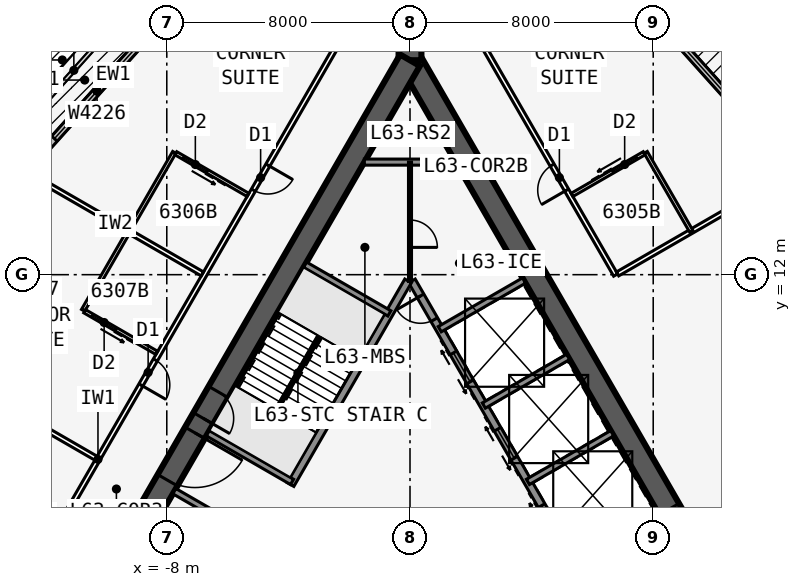
"""IFC4 building model, lengths in metres.
Left out: names, types, materials, properties, quantities, classifications, styles, units other than length and angle.
Written with IfcOpenShell. Run it as: python <this file> out.ifc"""

import sys

from ifc_helpers import new_model, si_unit, direction, frame, frame_2d, origin, place, context, subcontext, project, spatial, rectangle, extrude, element, fill, save


model = new_model("IFC4")
c1 = context("Model", 3, precision=1e-05, world=origin(), true_north=direction((0.0, 1.0)))
c2 = subcontext(c1, "Body", "Model", "MODEL_VIEW")
j1 = project(units=[si_unit("LENGTHUNIT", "METRE"), si_unit("PLANEANGLEUNIT", "RADIAN")], contexts=[c1])
p1 = place(None, origin())
s1 = spatial("IfcSite", under=j1, at=p1, CompositionType="ELEMENT")
p2 = place(p1, origin())
s2 = spatial("IfcBuilding", under=s1, at=p2, CompositionType="ELEMENT")
p3 = place(p2, frame((0.0, 0.0, 239.3)))
s3 = spatial("IfcBuildingStorey", under=s2, at=p3, CompositionType="ELEMENT", Elevation=239.3)
p4 = place(p3, frame((16.5, -9.526, 0.0), z_axis=(0.0, 0.0, 1.0), x_axis=(-0.499999749417, 0.866025548458, 0.0)))
e1 = element("IfcWall", 1, at=p4, inside=s3, PredefinedType="SHEAR", context=c2, shape_type="SweptSolid", body=[
    extrude(rectangle(XDim=33.0, YDim=0.75, at=frame_2d((16.5, 0.0))), origin(), (0.0, 0.0, 1.0), 3.6),
])
p5 = place(p4, frame((14.15, 0.0, 0.0)))
e2 = element("IfcOpeningElement", 2, at=p5, cuts=e1, PredefinedType="OPENING", context=c2, shape_type="SweptSolid", body=[
    extrude(rectangle(XDim=1.8, YDim=2.13, at=frame_2d((0.9, 1.065))), frame((0.0, 0.385, 0.0), z_axis=(0.0, -1.0, 0.0), x_axis=(1.0, 0.0, 0.0)), (0.0, 0.0, 1.0), 0.77),
])
p6 = place(p4, frame((12.6, 0.0, 0.0)))
e3 = element("IfcOpeningElement", 3, at=p6, cuts=e1, PredefinedType="OPENING", context=c2, shape_type="SweptSolid", body=[
    extrude(rectangle(XDim=1.0, YDim=2.13, at=frame_2d((0.5, 1.065))), frame((0.0, 0.385, 0.0), z_axis=(0.0, -1.0, 0.0), x_axis=(1.0, 0.0, 0.0)), (0.0, 0.0, 1.0), 0.77),
])
p7 = place(p3, frame((5.379, 2.586, 0.0), z_axis=(0.0, 0.0, 1.0), x_axis=(-0.500001375892, 0.866024609411, 0.0)))
e4 = element("IfcWall", 4, at=p7, inside=s3, PredefinedType="SOLIDWALL", context=c2, shape_type="SweptSolid", body=[
    extrude(rectangle(XDim=10.633, YDim=0.25, at=frame_2d((5.316, 0.0))), origin(), (0.0, 0.0, 1.0), 3.435),
])
p8 = place(p7, frame((9.164, 0.0, 0.0)))
e5 = element("IfcOpeningElement", 5, at=p8, cuts=e4, PredefinedType="OPENING", context=c2, shape_type="SweptSolid", body=[
    extrude(rectangle(XDim=0.9, YDim=2.13, at=frame_2d((0.45, 1.065))), frame((0.0, 0.135, 0.0), z_axis=(0.0, -1.0, 0.0), x_axis=(1.0, 0.0, 0.0)), (0.0, 0.0, 1.0), 0.27),
])
p9 = place(p7, frame((1.0, 0.0, 0.0)))
e6 = element("IfcOpeningElement", 6, at=p9, cuts=e4, PredefinedType="OPENING", context=c2, shape_type="SweptSolid", body=[
    extrude(rectangle(XDim=1.1, YDim=2.13, at=frame_2d((0.55, 1.065))), frame((0.0, 0.135, 0.0), z_axis=(0.0, -1.0, 0.0), x_axis=(1.0, 0.0, 0.0)), (0.0, 0.0, 1.0), 0.27),
])
p10 = place(p7, frame((3.9, 0.0, 0.0)))
e7 = element("IfcOpeningElement", 7, at=p10, cuts=e4, PredefinedType="OPENING", context=c2, shape_type="SweptSolid", body=[
    extrude(rectangle(XDim=1.1, YDim=2.13, at=frame_2d((0.55, 1.065))), frame((0.0, 0.135, 0.0), z_axis=(0.0, -1.0, 0.0), x_axis=(1.0, 0.0, 0.0)), (0.0, 0.0, 1.0), 0.27),
])
p11 = place(p7, frame((6.8, 0.0, 0.0)))
e8 = element("IfcOpeningElement", 8, at=p11, cuts=e4, PredefinedType="OPENING", context=c2, shape_type="SweptSolid", body=[
    extrude(rectangle(XDim=1.1, YDim=2.13, at=frame_2d((0.55, 1.065))), frame((0.0, 0.135, 0.0), z_axis=(0.0, -1.0, 0.0), x_axis=(1.0, 0.0, 0.0)), (0.0, 0.0, 1.0), 0.27),
])
p12 = place(p3, frame((5.329, 2.673, 0.0), z_axis=(0.0, 0.0, 1.0), x_axis=(0.866022944154, 0.50000426018, 0.0)))
e9 = element("IfcWall", 9, at=p12, inside=s3, PredefinedType="SOLIDWALL", context=c2, shape_type="SweptSolid", body=[
    extrude(rectangle(XDim=3.2, YDim=0.2, at=frame_2d((1.6, 0.0))), origin(), (0.0, 0.0, 1.0), 3.435),
])
for number, where, z_axis, x_axis in (
    (10, (3.879, 5.184, 0.0), (0.0, 0.0, 1.0), (0.866, 0.5, 0.0)),
    (11, (2.429, 7.696, 0.0), (0.0, 0.0, 1.0), (0.866, 0.5, 0.0)),
    (12, (0.979, 10.207, 0.0), (0.0, 0.0, 1.0), (0.866, 0.5, 0.0)),
):
    element("IfcWall", number, at=place(p3, frame(where, z_axis=z_axis, x_axis=x_axis)), inside=s3, PredefinedType="SOLIDWALL", context=c2, shape_type="SweptSolid", body=[
        extrude(rectangle(XDim=3.2, YDim=0.2, at=frame_2d((1.6, 0.0))), origin(), (0.0, 0.0, 1.0), 3.435),
    ])
p13 = place(p3, frame((0.0, 19.052, 0.0), z_axis=(0.0, 0.0, 1.0), x_axis=(-0.499999749417, -0.866025548458, 0.0)))
e13 = element("IfcWall", 13, at=p13, inside=s3, PredefinedType="SHEAR", context=c2, shape_type="SweptSolid", body=[
    extrude(rectangle(XDim=33.0, YDim=0.75, at=frame_2d((16.5, 0.0))), origin(), (0.0, 0.0, 1.0), 3.6),
])
p14 = place(p13, frame((14.15, 0.0, 0.0)))
e14 = element("IfcOpeningElement", 14, at=p14, cuts=e13, PredefinedType="OPENING", context=c2, shape_type="SweptSolid", body=[
    extrude(rectangle(XDim=1.8, YDim=2.13, at=frame_2d((0.9, 1.065))), frame((0.0, 0.385, 0.0), z_axis=(0.0, -1.0, 0.0), x_axis=(1.0, 0.0, 0.0)), (0.0, 0.0, 1.0), 0.77),
])
p15 = place(p13, frame((12.6, 0.0, 0.0)))
e15 = element("IfcOpeningElement", 15, at=p15, cuts=e13, PredefinedType="OPENING", context=c2, shape_type="SweptSolid", body=[
    extrude(rectangle(XDim=1.0, YDim=2.13, at=frame_2d((0.5, 1.065))), frame((0.0, 0.385, 0.0), z_axis=(0.0, -1.0, 0.0), x_axis=(1.0, 0.0, 0.0)), (0.0, 0.0, 1.0), 0.77),
])
p16 = place(p3, frame((-0.062, 11.794, 0.0), z_axis=(0.0, 0.0, 1.0), x_axis=(-0.500006680225, -0.86602154692, 0.0)))
e16 = element("IfcWall", 16, at=p16, inside=s3, PredefinedType="SOLIDWALL", context=c2, shape_type="SweptSolid", body=[
    extrude(rectangle(XDim=7.733, YDim=0.25, at=frame_2d((3.866, 0.0))), origin(), (0.0, 0.0, 1.0), 3.435),
])
for number, where, z_axis, x_axis in (
    (17, (-0.679, 10.727, 0.0), (0.0, 0.0, 1.0), (-0.866, 0.5, 0.0)),
    (18, (-3.879, 5.184, 0.0), (0.0, 0.0, 1.0), (-0.866, 0.5, 0.0)),
    (19, (-4.979, 3.279, 0.0), (0.0, 0.0, 1.0), (-0.866, 0.5, 0.0)),
):
    element("IfcWall", number, at=place(p3, frame(where, z_axis=z_axis, x_axis=x_axis)), inside=s3, PredefinedType="SOLIDWALL", context=c2, shape_type="SweptSolid", body=[
        extrude(rectangle(XDim=3.2, YDim=0.2, at=frame_2d((1.6, 0.0))), origin(), (0.0, 0.0, 1.0), 3.435),
    ])
p17 = place(p3, frame((0.0, 19.052, 0.0), z_axis=(0.0, 0.0, 1.0), x_axis=(0.0, 1.0, 0.0)))
e20 = element("IfcWall", 20, at=p17, inside=s3, PredefinedType="SHEAR", context=c2, shape_type="SweptSolid", body=[
    extrude(rectangle(XDim=4.746, YDim=0.75, at=frame_2d((2.373, 0.0))), origin(), (0.0, 0.0, 1.0), 3.6),
])
p18 = place(p17, frame((1.725, 0.0, 0.0)))
e21 = element("IfcOpeningElement", 21, at=p18, cuts=e20, PredefinedType="OPENING", context=c2, shape_type="SweptSolid", body=[
    extrude(rectangle(XDim=1.8, YDim=2.13, at=frame_2d((0.9, 1.065))), frame((0.0, 0.385, 0.0), z_axis=(0.0, -1.0, 0.0), x_axis=(1.0, 0.0, 0.0)), (0.0, 0.0, 1.0), 0.77),
])
p19 = place(p3, frame((12.68, 15.374, 0.0), z_axis=(0.0, 0.0, 1.0), x_axis=(-0.667303550892, 0.744785855778, 0.0)))
e22 = element("IfcWall", 22, at=p19, inside=s3, PredefinedType="STANDARD", context=c2, shape_type="SweptSolid", body=[
    extrude(rectangle(XDim=7.153, YDim=0.25, at=frame_2d((3.576, 0.0))), origin(), (0.0, 0.0, 1.0), 3.435),
])
p20 = place(p19, frame((1.476, 0.0, 0.45)))
e23 = element("IfcOpeningElement", 23, at=p20, cuts=e22, PredefinedType="OPENING", context=c2, shape_type="SweptSolid", body=[
    extrude(rectangle(XDim=4.2, YDim=2.6, at=frame_2d((2.1, 1.3))), frame((0.0, 0.135, 0.0), z_axis=(0.0, -1.0, 0.0), x_axis=(1.0, 0.0, 0.0)), (0.0, 0.0, 1.0), 0.27),
])
p21 = place(p3, frame((-7.907, 20.701, 0.0), z_axis=(0.0, 0.0, 1.0), x_axis=(-0.667303550892, -0.744785855778, 0.0)))
e24 = element("IfcWall", 24, at=p21, inside=s3, PredefinedType="STANDARD", context=c2, shape_type="SweptSolid", body=[
    extrude(rectangle(XDim=7.153, YDim=0.25, at=frame_2d((3.576, 0.0))), origin(), (0.0, 0.0, 1.0), 3.435),
])
p22 = place(p21, frame((1.476, 0.0, 0.45)))
e25 = element("IfcOpeningElement", 25, at=p22, cuts=e24, PredefinedType="OPENING", context=c2, shape_type="SweptSolid", body=[
    extrude(rectangle(XDim=4.2, YDim=2.6, at=frame_2d((2.1, 1.3))), frame((0.0, 0.135, 0.0), z_axis=(0.0, -1.0, 0.0), x_axis=(1.0, 0.0, 0.0)), (0.0, 0.0, 1.0), 0.27),
])
p23 = place(p3, frame((6.763, 11.988, 0.0), z_axis=(0.0, 0.0, 1.0), x_axis=(-0.49999585592, 0.866027796357, 0.0)))
e26 = element("IfcWall", 26, at=p23, inside=s3, PredefinedType="PARTITIONING", context=c2, shape_type="SweptSolid", body=[
    extrude(rectangle(XDim=12.677, YDim=0.15, at=frame_2d((6.338, 0.0))), origin(), (0.0, 0.0, 1.0), 3.435),
])
p24 = place(p23, frame((3.225, 0.0, 0.0)))
e27 = element("IfcOpeningElement", 27, at=p24, cuts=e26, PredefinedType="OPENING", context=c2, shape_type="SweptSolid", body=[
    extrude(rectangle(XDim=0.95, YDim=2.13, at=frame_2d((0.475, 1.065))), frame((0.0, 0.085, 0.0), z_axis=(0.0, -1.0, 0.0), x_axis=(1.0, 0.0, 0.0)), (0.0, 0.0, 1.0), 0.17),
])
p25 = place(p3, frame((6.829, 12.025, 0.0), z_axis=(0.0, 0.0, 1.0), x_axis=(0.866029323189, 0.499993211332, 0.0)))
e28 = element("IfcWall", 28, at=p25, inside=s3, PredefinedType="PARTITIONING", context=c2, shape_type="SweptSolid", body=[
    extrude(rectangle(XDim=6.608, YDim=0.15, at=frame_2d((3.304, 0.0))), origin(), (0.0, 0.0, 1.0), 2.678),
])
p26 = place(p3, frame((9.253, 13.425, 0.0), z_axis=(0.0, 0.0, 1.0), x_axis=(-0.499990139034, 0.866031096941, 0.0)))
e29 = element("IfcWall", 29, at=p26, inside=s3, PredefinedType="PLUMBINGWALL", context=c2, shape_type="SweptSolid", body=[
    extrude(rectangle(XDim=3.0, YDim=0.12, at=frame_2d((1.5, 0.0))), origin(), (0.0, 0.0, 1.0), 3.435),
])
p27 = place(p3, frame((5.329, 14.623, 0.0), z_axis=(0.0, 0.0, 1.0), x_axis=(0.865997131366, 0.500048966069, 0.0)))
e30 = element("IfcWall", 30, at=p27, inside=s3, PredefinedType="PLUMBINGWALL", context=c2, shape_type="SweptSolid", body=[
    extrude(rectangle(XDim=2.74, YDim=0.12, at=frame_2d((1.37, 0.0))), origin(), (0.0, 0.0, 1.0), 3.435),
])
p28 = place(p27, frame((1.55, 0.0, 0.0)))
e31 = element("IfcOpeningElement", 31, at=p28, cuts=e30, PredefinedType="OPENING", context=c2, shape_type="SweptSolid", body=[
    extrude(rectangle(XDim=0.9, YDim=2.13, at=frame_2d((0.45, 1.065))), frame((0.0, 0.07, 0.0), z_axis=(0.0, -1.0, 0.0), x_axis=(1.0, 0.0, 0.0)), (0.0, 0.0, 1.0), 0.14),
])
p29 = place(p3, frame((-0.425, 22.966, 0.0), z_axis=(0.0, 0.0, 1.0), x_axis=(-0.500000265775, -0.866025250339, 0.0)))
e32 = element("IfcWall", 32, at=p29, inside=s3, PredefinedType="PARTITIONING", context=c2, shape_type="SweptSolid", body=[
    extrude(rectangle(XDim=39.354, YDim=0.15, at=frame_2d((19.677, 0.0))), origin(), (0.0, 0.0, 1.0), 3.435),
])
p30 = place(p29, frame((8.502, 0.0, 0.0)))
e33 = element("IfcOpeningElement", 33, at=p30, cuts=e32, PredefinedType="OPENING", context=c2, shape_type="SweptSolid", body=[
    extrude(rectangle(XDim=0.95, YDim=2.13, at=frame_2d((0.475, 1.065))), frame((0.0, 0.085, 0.0), z_axis=(0.0, -1.0, 0.0), x_axis=(1.0, 0.0, 0.0)), (0.0, 0.0, 1.0), 0.17),
])
p31 = place(p29, frame((15.902, 0.0, 0.0)))
e34 = element("IfcOpeningElement", 34, at=p31, cuts=e32, PredefinedType="OPENING", context=c2, shape_type="SweptSolid", body=[
    extrude(rectangle(XDim=0.95, YDim=2.13, at=frame_2d((0.475, 1.065))), frame((0.0, 0.085, 0.0), z_axis=(0.0, -1.0, 0.0), x_axis=(1.0, 0.0, 0.0)), (0.0, 0.0, 1.0), 0.17),
])
p32 = place(p29, frame((22.902, 0.0, 0.0)))
e35 = element("IfcOpeningElement", 35, at=p32, cuts=e32, PredefinedType="OPENING", context=c2, shape_type="SweptSolid", body=[
    extrude(rectangle(XDim=0.95, YDim=2.13, at=frame_2d((0.475, 1.065))), frame((0.0, 0.085, 0.0), z_axis=(0.0, -1.0, 0.0), x_axis=(1.0, 0.0, 0.0)), (0.0, 0.0, 1.0), 0.17),
])
p33 = place(p29, frame((29.902, 0.0, 0.0)))
e36 = element("IfcOpeningElement", 36, at=p33, cuts=e32, PredefinedType="OPENING", context=c2, shape_type="SweptSolid", body=[
    extrude(rectangle(XDim=0.95, YDim=2.13, at=frame_2d((0.475, 1.065))), frame((0.0, 0.085, 0.0), z_axis=(0.0, -1.0, 0.0), x_axis=(1.0, 0.0, 0.0)), (0.0, 0.0, 1.0), 0.17),
])
p34 = place(p3, frame((-6.829, 12.025, 0.0), z_axis=(0.0, 0.0, 1.0), x_axis=(-0.866029323189, 0.499993211332, 0.0)))
e37 = element("IfcWall", 37, at=p34, inside=s3, PredefinedType="PARTITIONING", context=c2, shape_type="SweptSolid", body=[
    extrude(rectangle(XDim=6.608, YDim=0.15, at=frame_2d((3.304, 0.0))), origin(), (0.0, 0.0, 1.0), 2.678),
])
p35 = place(p3, frame((-10.329, 5.963, 0.0), z_axis=(0.0, 0.0, 1.0), x_axis=(-0.866011785882, 0.500023586156, 0.0)))
e38 = element("IfcWall", 38, at=p35, inside=s3, PredefinedType="PARTITIONING", context=c2, shape_type="SweptSolid", body=[
    extrude(rectangle(XDim=6.854, YDim=0.15, at=frame_2d((3.427, 0.0))), origin(), (0.0, 0.0, 1.0), 2.678),
])
p36 = place(p3, frame((-7.753, 16.023, 0.0), z_axis=(0.0, 0.0, 1.0), x_axis=(-0.499990139034, -0.866031096941, 0.0)))
e39 = element("IfcWall", 39, at=p36, inside=s3, PredefinedType="PLUMBINGWALL", context=c2, shape_type="SweptSolid", body=[
    extrude(rectangle(XDim=3.0, YDim=0.12, at=frame_2d((1.5, 0.0))), origin(), (0.0, 0.0, 1.0), 3.435),
])
p37 = place(p3, frame((-5.329, 14.623, 0.0), z_axis=(0.0, 0.0, 1.0), x_axis=(-0.865997131366, 0.500048966069, 0.0)))
e40 = element("IfcWall", 40, at=p37, inside=s3, PredefinedType="PLUMBINGWALL", context=c2, shape_type="SweptSolid", body=[
    extrude(rectangle(XDim=2.74, YDim=0.12, at=frame_2d((1.37, 0.0))), origin(), (0.0, 0.0, 1.0), 3.435),
])
p38 = place(p37, frame((1.55, 0.0, 0.0)))
e41 = element("IfcOpeningElement", 41, at=p38, cuts=e40, PredefinedType="OPENING", context=c2, shape_type="SweptSolid", body=[
    extrude(rectangle(XDim=0.9, YDim=2.13, at=frame_2d((0.45, 1.065))), frame((0.0, 0.07, 0.0), z_axis=(0.0, -1.0, 0.0), x_axis=(1.0, 0.0, 0.0)), (0.0, 0.0, 1.0), 0.14),
])
p39 = place(p3, frame((-9.253, 13.425, 0.0), z_axis=(0.0, 0.0, 1.0), x_axis=(-0.499990139034, -0.866031096941, 0.0)))
e42 = element("IfcWall", 42, at=p39, inside=s3, PredefinedType="PLUMBINGWALL", context=c2, shape_type="SweptSolid", body=[
    extrude(rectangle(XDim=3.0, YDim=0.12, at=frame_2d((1.5, 0.0))), origin(), (0.0, 0.0, 1.0), 3.435),
])
p40 = place(p3, frame((-8.329, 9.427, 0.0), z_axis=(0.0, 0.0, 1.0), x_axis=(-0.866035715982, 0.499982138324, 0.0)))
e43 = element("IfcWall", 43, at=p40, inside=s3, PredefinedType="PLUMBINGWALL", context=c2, shape_type="SweptSolid", body=[
    extrude(rectangle(XDim=2.74, YDim=0.12, at=frame_2d((1.37, 0.0))), origin(), (0.0, 0.0, 1.0), 3.435),
])
p41 = place(p40, frame((1.55, 0.0, 0.0)))
e44 = element("IfcOpeningElement", 44, at=p41, cuts=e43, PredefinedType="OPENING", context=c2, shape_type="SweptSolid", body=[
    extrude(rectangle(XDim=0.9, YDim=2.13, at=frame_2d((0.45, 1.065))), frame((0.0, 0.07, 0.0), z_axis=(0.0, -1.0, 0.0), x_axis=(1.0, 0.0, 0.0)), (0.0, 0.0, 1.0), 0.14),
])
p42 = place(p3, frame((-1.501, 15.703, 0.0), z_axis=(0.0, 0.0, 1.0), x_axis=(1.0, 0.0, 0.0)))
e45 = element("IfcWall", 45, at=p42, inside=s3, PredefinedType="SOLIDWALL", context=c2, shape_type="SweptSolid", body=[
    extrude(rectangle(XDim=3.002, YDim=0.2, at=frame_2d((1.501, 0.0))), origin(), (0.0, 0.0, 1.0), 3.435),
])
p43 = place(p3, frame((0.0, 15.703, 0.0), z_axis=(0.0, 0.0, 1.0), x_axis=(0.0, -1.0, 0.0)))
e46 = element("IfcWall", 46, at=p43, inside=s3, PredefinedType="PARTITIONING", context=c2, shape_type="SweptSolid", body=[
    extrude(rectangle(XDim=3.925, YDim=0.1, at=frame_2d((1.963, 0.0))), origin(), (0.0, 0.0, 1.0), 3.435),
])
p44 = place(p43, frame((1.905, 0.0, 0.0)))
e47 = element("IfcOpeningElement", 47, at=p44, cuts=e46, PredefinedType="OPENING", context=c2, shape_type="SweptSolid", body=[
    extrude(rectangle(XDim=0.9, YDim=2.13, at=frame_2d((0.45, 1.065))), frame((0.0, 0.06, 0.0), z_axis=(0.0, -1.0, 0.0), x_axis=(1.0, 0.0, 0.0)), (0.0, 0.0, 1.0), 0.12),
])
p45 = place(p3, frame((-2.988, 9.978, 0.0), z_axis=(0.0, 0.0, 1.0), x_axis=(-0.499992232847, -0.866029888106, 0.0)))
e48 = element("IfcWall", 48, at=p45, inside=s3, PredefinedType="SOLIDWALL", context=c2, shape_type="SweptSolid", body=[
    extrude(rectangle(XDim=2.794, YDim=0.1, at=frame_2d((1.397, 0.0))), origin(), (0.0, 0.0, 1.0), 3.6),
])
p46 = place(p20, origin())
e49 = element("IfcWindow", 49, at=p46, inside=s3, PartitioningType="SINGLE_PANEL", PredefinedType="WINDOW", context=c2, shape_type="SweptSolid", body=[
    extrude(rectangle(XDim=4.2, YDim=2.6, at=frame_2d((2.1, 1.3))), frame((0.0, 0.03, 0.0), z_axis=(0.0, -1.0, 0.0), x_axis=(1.0, 0.0, 0.0)), (0.0, 0.0, 1.0), 0.06),
])
fill(e23, e49)
p47 = place(p22, origin())
e50 = element("IfcWindow", 50, at=p47, inside=s3, PartitioningType="SINGLE_PANEL", PredefinedType="WINDOW", context=c2, shape_type="SweptSolid", body=[
    extrude(rectangle(XDim=4.2, YDim=2.6, at=frame_2d((2.1, 1.3))), frame((0.0, 0.03, 0.0), z_axis=(0.0, -1.0, 0.0), x_axis=(1.0, 0.0, 0.0)), (0.0, 0.0, 1.0), 0.06),
])
fill(e25, e50)
p48 = place(p28, origin())
e51 = element("IfcDoor", 51, at=p48, inside=s3, OperationType="SLIDING_TO_LEFT", PredefinedType="DOOR", context=c2, shape_type="SweptSolid", body=[
    extrude(rectangle(XDim=0.9, YDim=2.13, at=frame_2d((0.45, 1.065))), frame((0.0, 0.025, 0.0), z_axis=(0.0, -1.0, 0.0), x_axis=(1.0, 0.0, 0.0)), (0.0, 0.0, 1.0), 0.05),
])
fill(e31, e51)
p49 = place(p24, origin())
e52 = element("IfcDoor", 52, at=p49, inside=s3, OperationType="SINGLE_SWING_LEFT", PredefinedType="DOOR", context=c2, shape_type="SweptSolid", body=[
    extrude(rectangle(XDim=0.95, YDim=2.13, at=frame_2d((0.475, 1.065))), frame((0.0, 0.025, 0.0), z_axis=(0.0, -1.0, 0.0), x_axis=(1.0, 0.0, 0.0)), (0.0, 0.0, 1.0), 0.05),
])
fill(e27, e52)
p50 = place(p38, origin())
e53 = element("IfcDoor", 53, at=p50, inside=s3, OperationType="SLIDING_TO_LEFT", PredefinedType="DOOR", context=c2, shape_type="SweptSolid", body=[
    extrude(rectangle(XDim=0.9, YDim=2.13, at=frame_2d((0.45, 1.065))), frame((0.0, 0.025, 0.0), z_axis=(0.0, -1.0, 0.0), x_axis=(1.0, 0.0, 0.0)), (0.0, 0.0, 1.0), 0.05),
])
fill(e41, e53)
p51 = place(p30, origin())
e54 = element("IfcDoor", 54, at=p51, inside=s3, OperationType="SINGLE_SWING_LEFT", PredefinedType="DOOR", context=c2, shape_type="SweptSolid", body=[
    extrude(rectangle(XDim=0.95, YDim=2.13, at=frame_2d((0.475, 1.065))), frame((0.0, 0.025, 0.0), z_axis=(0.0, -1.0, 0.0), x_axis=(1.0, 0.0, 0.0)), (0.0, 0.0, 1.0), 0.05),
])
fill(e33, e54)
p52 = place(p41, origin())
e55 = element("IfcDoor", 55, at=p52, inside=s3, OperationType="SLIDING_TO_LEFT", PredefinedType="DOOR", context=c2, shape_type="SweptSolid", body=[
    extrude(rectangle(XDim=0.9, YDim=2.13, at=frame_2d((0.45, 1.065))), frame((0.0, 0.025, 0.0), z_axis=(0.0, -1.0, 0.0), x_axis=(1.0, 0.0, 0.0)), (0.0, 0.0, 1.0), 0.05),
])
fill(e44, e55)
p53 = place(p31, origin())
e56 = element("IfcDoor", 56, at=p53, inside=s3, OperationType="SINGLE_SWING_RIGHT", PredefinedType="DOOR", context=c2, shape_type="SweptSolid", body=[
    extrude(rectangle(XDim=0.95, YDim=2.13, at=frame_2d((0.475, 1.065))), frame((0.0, 0.025, 0.0), z_axis=(0.0, -1.0, 0.0), x_axis=(1.0, 0.0, 0.0)), (0.0, 0.0, 1.0), 0.05),
])
fill(e34, e56)
p54 = place(p14, origin())
e57 = element("IfcDoor", 57, at=p54, inside=s3, OperationType="DOUBLE_DOOR_SINGLE_SWING", PredefinedType="DOOR", context=c2, shape_type="SweptSolid", body=[
    extrude(rectangle(XDim=1.8, YDim=2.13, at=frame_2d((0.9, 1.065))), frame((0.0, 0.025, 0.0), z_axis=(0.0, -1.0, 0.0), x_axis=(1.0, 0.0, 0.0)), (0.0, 0.0, 1.0), 0.05),
])
fill(e14, e57)
p55 = place(p15, origin())
e58 = element("IfcDoor", 58, at=p55, inside=s3, OperationType="SINGLE_SWING_RIGHT", PredefinedType="DOOR", context=c2, shape_type="SweptSolid", body=[
    extrude(rectangle(XDim=1.0, YDim=2.13, at=frame_2d((0.5, 1.065))), frame((0.0, 0.025, 0.0), z_axis=(0.0, -1.0, 0.0), x_axis=(1.0, 0.0, 0.0)), (0.0, 0.0, 1.0), 0.05),
])
fill(e15, e58)
p56 = place(p8, origin())
e59 = element("IfcDoor", 59, at=p56, inside=s3, OperationType="SINGLE_SWING_RIGHT", PredefinedType="DOOR", context=c2, shape_type="SweptSolid", body=[
    extrude(rectangle(XDim=0.9, YDim=2.13, at=frame_2d((0.45, 1.065))), frame((0.0, 0.025, 0.0), z_axis=(0.0, -1.0, 0.0), x_axis=(1.0, 0.0, 0.0)), (0.0, 0.0, 1.0), 0.05),
])
fill(e5, e59)
p57 = place(p44, origin())
e60 = element("IfcDoor", 60, at=p57, inside=s3, OperationType="SINGLE_SWING_RIGHT", PredefinedType="DOOR", context=c2, shape_type="SweptSolid", body=[
    extrude(rectangle(XDim=0.9, YDim=2.13, at=frame_2d((0.45, 1.065))), frame((0.0, 0.025, 0.0), z_axis=(0.0, -1.0, 0.0), x_axis=(1.0, 0.0, 0.0)), (0.0, 0.0, 1.0), 0.05),
])
fill(e47, e60)
p58 = place(p9, origin())
e61 = element("IfcDoor", 61, at=p58, inside=s3, OperationType="DOUBLE_DOOR_SLIDING", PredefinedType="USERDEFINED", context=c2, shape_type="SweptSolid", body=[
    extrude(rectangle(XDim=1.1, YDim=2.13, at=frame_2d((0.55, 1.065))), frame((0.0, 0.025, 0.0), z_axis=(0.0, -1.0, 0.0), x_axis=(1.0, 0.0, 0.0)), (0.0, 0.0, 1.0), 0.05),
])
fill(e6, e61)
p59 = place(p10, origin())
e62 = element("IfcDoor", 62, at=p59, inside=s3, OperationType="DOUBLE_DOOR_SLIDING", PredefinedType="USERDEFINED", context=c2, shape_type="SweptSolid", body=[
    extrude(rectangle(XDim=1.1, YDim=2.13, at=frame_2d((0.55, 1.065))), frame((0.0, 0.025, 0.0), z_axis=(0.0, -1.0, 0.0), x_axis=(1.0, 0.0, 0.0)), (0.0, 0.0, 1.0), 0.05),
])
fill(e7, e62)
p60 = place(p11, origin())
e63 = element("IfcDoor", 63, at=p60, inside=s3, OperationType="DOUBLE_DOOR_SLIDING", PredefinedType="USERDEFINED", context=c2, shape_type="SweptSolid", body=[
    extrude(rectangle(XDim=1.1, YDim=2.13, at=frame_2d((0.55, 1.065))), frame((0.0, 0.025, 0.0), z_axis=(0.0, -1.0, 0.0), x_axis=(1.0, 0.0, 0.0)), (0.0, 0.0, 1.0), 0.05),
])
fill(e8, e63)
save(model, sys.argv[1])
